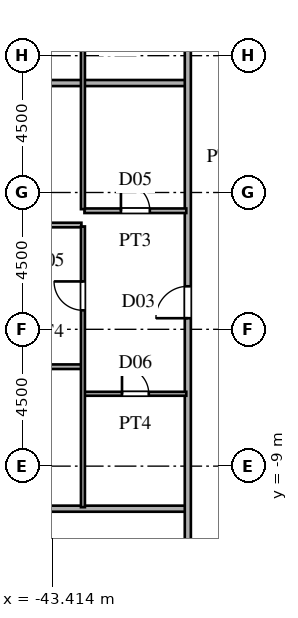
"""IFC4 building model, lengths in metres.
Left out: names, types, materials, properties, quantities, classifications, styles, units other than length and angle.
Written with IfcOpenShell. Run it as: python <this file> out.ifc"""

import sys

from ifc_helpers import new_model, si_unit, direction, frame, frame_2d, origin, place, context, subcontext, project, spatial, rectangle, extrude, source, transform, mapped, element, fill, save


model = new_model("IFC4")
c1 = context("Model", 3, precision=1e-05, world=origin(), true_north=direction((0.0, 1.0)))
c2 = subcontext(c1, "Body", "Model", "MODEL_VIEW")
j1 = project(units=[si_unit("LENGTHUNIT", "METRE"), si_unit("PLANEANGLEUNIT", "RADIAN")], contexts=[c1])
p1 = place(None, origin())
s1 = spatial("IfcSite", under=j1, at=p1, CompositionType="ELEMENT")
p2 = place(p1, origin())
s2 = spatial("IfcBuilding", under=s1, at=p2, CompositionType="ELEMENT")
p3 = place(p2, frame((0.0, 0.0, 117.6)))
s3 = spatial("IfcBuildingStorey", under=s2, at=p3, CompositionType="ELEMENT", Elevation=117.6)
p4 = place(p3, frame((-58.988, -10.4, 0.0), z_axis=(0.0, 0.0, 1.0), x_axis=(1.0, 0.0, 0.0)))
e1 = element("IfcWall", 1, at=p4, inside=s3, PredefinedType="PARTITIONING", context=c2, shape_type="SweptSolid", body=[
    extrude(rectangle(XDim=19.958, YDim=0.2, at=frame_2d((9.979, 0.0))), origin(), (0.0, 0.0, 1.0), 3.38),
])
p5 = place(p3, frame((-42.35, -6.62, 0.0), z_axis=(0.0, 0.0, 1.0), x_axis=(1.0, 0.0, 0.0)))
e2 = element("IfcWall", 2, at=p5, inside=s3, PredefinedType="PARTITIONING", context=c2, shape_type="SweptSolid", body=[
    extrude(rectangle(XDim=3.35, YDim=0.13, at=frame_2d((1.675, 0.0))), origin(), (0.0, 0.0, 1.0), 3.38),
])
p6 = place(p5, frame((1.235, 0.0, 0.0)))
e3 = element("IfcOpeningElement", 3, at=p6, cuts=e2, PredefinedType="OPENING", context=c2, shape_type="SweptSolid", body=[
    extrude(rectangle(XDim=0.88, YDim=2.1, at=frame_2d((0.44, 1.05))), frame((0.0, 0.075, 0.0), z_axis=(0.0, -1.0, 0.0), x_axis=(1.0, 0.0, 0.0)), (0.0, 0.0, 1.0), 0.15),
])
p7 = place(p3, frame((-68.106, -5.73, 0.0), z_axis=(0.0, 0.0, 1.0), x_axis=(1.0, 0.0, 0.0)))
e4 = element("IfcWall", 4, at=p7, inside=s3, PredefinedType="PARTITIONING", context=c2, shape_type="SweptSolid", body=[
    extrude(rectangle(XDim=25.656, YDim=0.15, at=frame_2d((12.828, 0.0))), origin(), (0.0, 0.0, 1.0), 3.38),
])
p8 = place(p7, frame((23.079, 0.0, 0.0)))
e5 = element("IfcOpeningElement", 5, at=p8, cuts=e4, PredefinedType="OPENING", context=c2, shape_type="SweptSolid", body=[
    extrude(rectangle(XDim=0.95, YDim=2.15, at=frame_2d((0.475, 1.075))), frame((0.0, 0.085, 0.0), z_axis=(0.0, -1.0, 0.0), x_axis=(1.0, 0.0, 0.0)), (0.0, 0.0, 1.0), 0.17),
])
p9 = place(p7, frame((10.281, 0.0, 0.0)))
e6 = element("IfcOpeningElement", 6, at=p9, cuts=e4, PredefinedType="OPENING", context=c2, shape_type="SweptSolid", body=[
    extrude(rectangle(XDim=0.95, YDim=2.15, at=frame_2d((0.475, 1.075))), frame((0.0, 0.085, 0.0), z_axis=(0.0, -1.0, 0.0), x_axis=(1.0, 0.0, 0.0)), (0.0, 0.0, 1.0), 0.17),
])
p10 = place(p3, frame((-69.535, -1.07, 0.0), z_axis=(0.0, 0.0, 1.0), x_axis=(1.0, 0.0, 0.0)))
e7 = element("IfcWall", 7, at=p10, inside=s3, PredefinedType="PARTITIONING", context=c2, shape_type="SweptSolid", body=[
    extrude(rectangle(XDim=27.085, YDim=0.15, at=frame_2d((13.542, 0.0))), origin(), (0.0, 0.0, 1.0), 3.38),
])
p11 = place(p10, frame((23.635, 0.0, 0.0)))
e8 = element("IfcOpeningElement", 8, at=p11, cuts=e7, PredefinedType="OPENING", context=c2, shape_type="SweptSolid", body=[
    extrude(rectangle(XDim=0.95, YDim=2.15, at=frame_2d((0.475, 1.075))), frame((0.0, 0.085, 0.0), z_axis=(0.0, -1.0, 0.0), x_axis=(1.0, 0.0, 0.0)), (0.0, 0.0, 1.0), 0.17),
])
p12 = place(p10, frame((11.71, 0.0, 0.0)))
e9 = element("IfcOpeningElement", 9, at=p12, cuts=e7, PredefinedType="OPENING", context=c2, shape_type="SweptSolid", body=[
    extrude(rectangle(XDim=0.95, YDim=2.15, at=frame_2d((0.475, 1.075))), frame((0.0, 0.085, 0.0), z_axis=(0.0, -1.0, 0.0), x_axis=(1.0, 0.0, 0.0)), (0.0, 0.0, 1.0), 0.17),
])
p13 = place(p3, frame((-42.35, -0.6, 0.0), z_axis=(0.0, 0.0, 1.0), x_axis=(1.0, 0.0, 0.0)))
e10 = element("IfcWall", 10, at=p13, inside=s3, PredefinedType="PARTITIONING", context=c2, shape_type="SweptSolid", body=[
    extrude(rectangle(XDim=3.35, YDim=0.15, at=frame_2d((1.675, 0.0))), origin(), (0.0, 0.0, 1.0), 3.38),
])
p14 = place(p13, frame((1.2, 0.0, 0.0)))
e11 = element("IfcOpeningElement", 11, at=p14, cuts=e10, PredefinedType="OPENING", context=c2, shape_type="SweptSolid", body=[
    extrude(rectangle(XDim=0.95, YDim=2.15, at=frame_2d((0.475, 1.075))), frame((0.0, 0.085, 0.0), z_axis=(0.0, -1.0, 0.0), x_axis=(1.0, 0.0, 0.0)), (0.0, 0.0, 1.0), 0.17),
])
p15 = place(p3, frame((-69.505, 3.6, 0.0), z_axis=(0.0, 0.0, 1.0), x_axis=(1.0, 0.0, 0.0)))
e12 = element("IfcWall", 12, at=p15, inside=s3, PredefinedType="PARTITIONING", context=c2, shape_type="SweptSolid", body=[
    extrude(rectangle(XDim=30.475, YDim=0.2, at=frame_2d((15.237, 0.0))), origin(), (0.0, 0.0, 1.0), 3.38),
])
p16 = place(p3, frame((-42.4, -10.35, 0.0), z_axis=(0.0, 0.0, 1.0), x_axis=(0.0, 1.0, 0.0)))
e13 = element("IfcWall", 13, at=p16, inside=s3, PredefinedType="PARTITIONING", context=c2, shape_type="SweptSolid", body=[
    extrude(rectangle(XDim=9.233, YDim=0.13, at=frame_2d((4.617, 0.0))), origin(), (0.0, 0.0, 1.0), 3.38),
])
p17 = place(p16, frame((6.475, 0.0, 0.0)))
e14 = element("IfcOpeningElement", 14, at=p17, cuts=e13, PredefinedType="OPENING", context=c2, shape_type="SweptSolid", body=[
    extrude(rectangle(XDim=0.95, YDim=2.15, at=frame_2d((0.475, 1.075))), frame((0.0, 0.075, 0.0), z_axis=(0.0, -1.0, 0.0), x_axis=(1.0, 0.0, 0.0)), (0.0, 0.0, 1.0), 0.15),
])
p18 = place(p3, frame((-42.4, -0.548, 0.0), z_axis=(0.0, 0.0, 1.0), x_axis=(0.0, 1.0, 0.0)))
e15 = element("IfcWall", 15, at=p18, inside=s3, PredefinedType="PARTITIONING", context=c2, shape_type="SweptSolid", body=[
    extrude(rectangle(XDim=8.625, YDim=0.13, at=frame_2d((4.312, 0.0))), origin(), (0.0, 0.0, 1.0), 3.38),
])
p19 = place(p3, frame((-38.95, -15.515, 0.0), z_axis=(0.0, 0.0, 1.0), x_axis=(0.0, 1.0, 0.0)))
e16 = element("IfcWall", 16, at=p19, inside=s3, PredefinedType="PARTITIONING", context=c2, shape_type="SweptSolid", body=[
    extrude(rectangle(XDim=31.03, YDim=0.2, at=frame_2d((15.515, 0.0))), origin(), (0.0, 0.0, 1.0), 3.38),
])
p20 = place(p19, frame((1.99, 0.0, 0.0)))
e17 = element("IfcOpeningElement", 17, at=p20, cuts=e16, PredefinedType="OPENING", context=c2, shape_type="SweptSolid", body=[
    extrude(rectangle(XDim=1.05, YDim=2.25, at=frame_2d((0.525, 1.125))), frame((0.0, 0.11, 0.0), z_axis=(0.0, -1.0, 0.0), x_axis=(1.0, 0.0, 0.0)), (0.0, 0.0, 1.0), 0.22),
])
p21 = place(p19, frame((11.38, 0.0, 0.0)))
e18 = element("IfcOpeningElement", 18, at=p21, cuts=e16, PredefinedType="OPENING", context=c2, shape_type="SweptSolid", body=[
    extrude(rectangle(XDim=1.05, YDim=2.25, at=frame_2d((0.525, 1.125))), frame((0.0, 0.11, 0.0), z_axis=(0.0, -1.0, 0.0), x_axis=(1.0, 0.0, 0.0)), (0.0, 0.0, 1.0), 0.22),
])
p22 = place(p19, frame((24.617, 0.0, 0.0)))
e19 = element("IfcOpeningElement", 19, at=p22, cuts=e16, PredefinedType="OPENING", context=c2, shape_type="SweptSolid", body=[
    extrude(rectangle(XDim=1.05, YDim=2.25, at=frame_2d((0.525, 1.125))), frame((0.0, 0.11, 0.0), z_axis=(0.0, -1.0, 0.0), x_axis=(1.0, 0.0, 0.0)), (0.0, 0.0, 1.0), 0.22),
])
m1 = source(origin(), c2, "Body", "SweptSolid", [
    extrude(rectangle(XDim=0.88, YDim=2.1, at=frame_2d((0.44, 1.05))), frame((0.0, 0.025, 0.0), z_axis=(0.0, -1.0, 0.0), x_axis=(1.0, 0.0, 0.0)), (0.0, 0.0, 1.0), 0.05),
])
p23 = place(p6, origin())
e20 = element("IfcDoor", 20, at=p23, inside=s3, OperationType="SINGLE_SWING_LEFT", PredefinedType="DOOR", context=c2, shape_type="MappedRepresentation", body=[
    mapped(m1, transform((0.0, 0.0, 0.0), scale=1.0)),
])
fill(e3, e20)
m2 = source(origin(), c2, "Body", "SweptSolid", [
    extrude(rectangle(XDim=0.95, YDim=2.15, at=frame_2d((0.475, 1.075))), frame((0.0, 0.025, 0.0), z_axis=(0.0, -1.0, 0.0), x_axis=(1.0, 0.0, 0.0)), (0.0, 0.0, 1.0), 0.05),
])
p24 = place(p14, origin())
e21 = element("IfcDoor", 21, at=p24, inside=s3, OperationType="SINGLE_SWING_LEFT", PredefinedType="DOOR", context=c2, shape_type="MappedRepresentation", body=[
    mapped(m2, transform((0.0, 0.0, 0.0), scale=1.0)),
])
fill(e11, e21)
p25 = place(p17, origin())
e22 = element("IfcDoor", 22, at=p25, inside=s3, OperationType="SINGLE_SWING_RIGHT", PredefinedType="DOOR", context=c2, shape_type="MappedRepresentation", body=[
    mapped(m2, transform((0.0, 0.0, 0.0), scale=1.0)),
])
fill(e14, e22)
m3 = source(origin(), c2, "Body", "SweptSolid", [
    extrude(rectangle(XDim=1.05, YDim=2.25, at=frame_2d((0.525, 1.125))), frame((0.0, 0.025, 0.0), z_axis=(0.0, -1.0, 0.0), x_axis=(1.0, 0.0, 0.0)), (0.0, 0.0, 1.0), 0.05),
])
p26 = place(p21, origin())
e23 = element("IfcDoor", 23, at=p26, inside=s3, OperationType="SINGLE_SWING_LEFT", PredefinedType="DOOR", context=c2, shape_type="MappedRepresentation", body=[
    mapped(m3, transform((0.0, 0.0, 0.0), scale=1.0)),
])
fill(e18, e23)
save(model, sys.argv[1])
